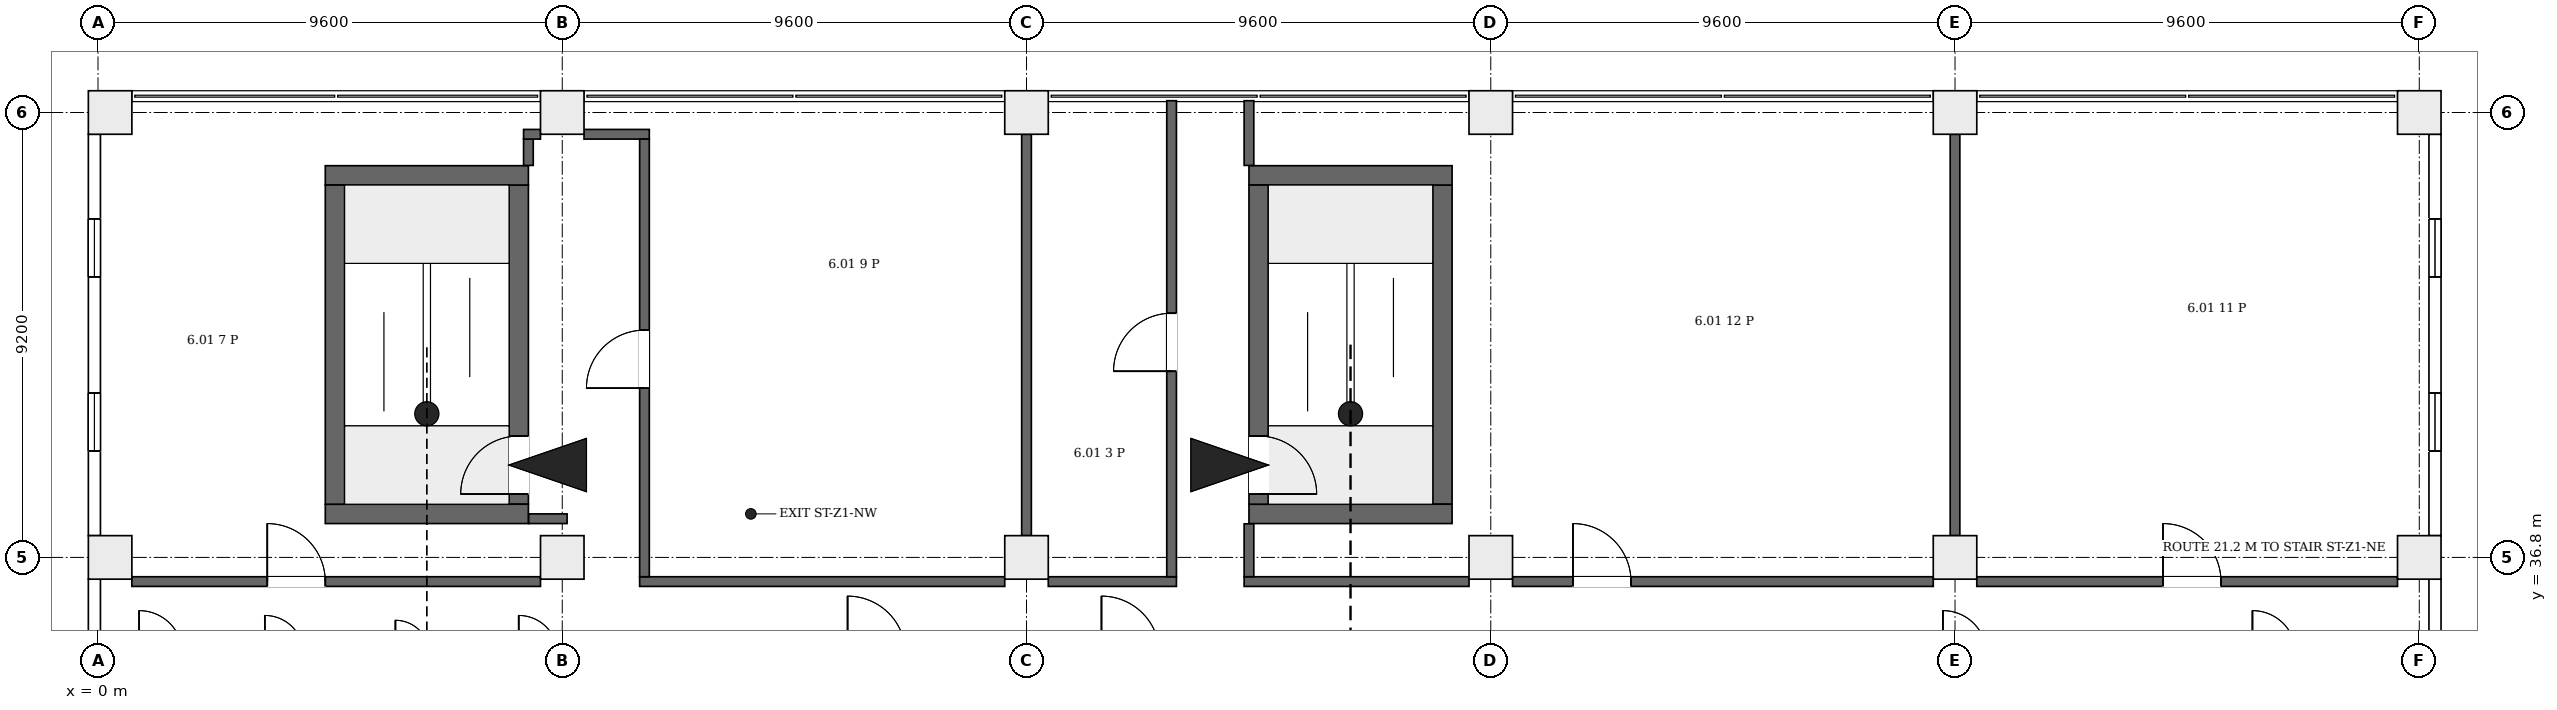
"""IFC4 building model, lengths in metres.
Left out: names, types, materials, properties, quantities, classifications, styles, units other than length and angle.
Written with IfcOpenShell. Run it as: python <this file> out.ifc"""

import sys

from ifc_helpers import new_model, si_unit, direction, frame, frame_2d, origin, origin_2d, place, context, subcontext, project, spatial, rectangle, extrude, element, fill, save


model = new_model("IFC4")
c1 = context("Model", 3, precision=1e-05, world=origin(), true_north=direction((0.0, 1.0)))
c2 = subcontext(c1, "Body", "Model", "MODEL_VIEW")
j1 = project(units=[si_unit("LENGTHUNIT", "METRE"), si_unit("PLANEANGLEUNIT", "RADIAN")], contexts=[c1])
p1 = place(None, origin())
s1 = spatial("IfcSite", under=j1, at=p1, CompositionType="ELEMENT")
p2 = place(p1, origin())
s2 = spatial("IfcBuilding", under=s1, at=p2, CompositionType="ELEMENT")
p3 = place(p2, frame((0.0, 0.0, 36.1)))
s3 = spatial("IfcBuildingStorey", under=s2, at=p3, CompositionType="ELEMENT", Elevation=36.1)
for number, where, z_axis, x_axis in (
    (1, (4.7, 37.7, 0.0), (0.0, 0.0, 1.0), (1.0, 0.0, 0.0)),
    (2, (4.7, 44.7, 0.0), (0.0, 0.0, 1.0), (1.0, 0.0, 0.0)),
):
    element("IfcWall", number, at=place(p3, frame(where, z_axis=z_axis, x_axis=x_axis)), inside=s3, PredefinedType="SHEAR", context=c2, shape_type="SweptSolid", body=[
        extrude(rectangle(XDim=4.2, YDim=0.4, at=frame_2d((2.1, 0.0))), origin(), (0.0, 0.0, 1.0), 4.2),
    ])
p4 = place(p3, frame((4.9, 37.9, 0.0), z_axis=(0.0, 0.0, 1.0), x_axis=(0.0, 1.0, 0.0)))
e3 = element("IfcWall", 3, at=p4, inside=s3, PredefinedType="SHEAR", context=c2, shape_type="SweptSolid", body=[
    extrude(rectangle(XDim=6.6, YDim=0.4, at=frame_2d((3.3, 0.0))), origin(), (0.0, 0.0, 1.0), 4.2),
])
p5 = place(p3, frame((8.7, 37.9, 0.0), z_axis=(0.0, 0.0, 1.0), x_axis=(0.0, 1.0, 0.0)))
e4 = element("IfcWall", 4, at=p5, inside=s3, PredefinedType="SHEAR", context=c2, shape_type="SweptSolid", body=[
    extrude(rectangle(XDim=6.6, YDim=0.4, at=frame_2d((3.3, 0.0))), origin(), (0.0, 0.0, 1.0), 4.2),
])
p6 = place(p5, frame((0.21, 0.0, 0.0)))
e5 = element("IfcOpeningElement", 5, at=p6, cuts=e4, PredefinedType="OPENING", context=c2, shape_type="SweptSolid", body=[
    extrude(rectangle(XDim=1.2, YDim=2.1, at=frame_2d((0.6, 1.05))), frame((0.0, 0.21, 0.0), z_axis=(0.0, -1.0, 0.0), x_axis=(1.0, 0.0, 0.0)), (0.0, 0.0, 1.0), 0.42),
])
for number, where, z_axis, x_axis in (
    (6, (23.8, 37.7, 0.0), (0.0, 0.0, 1.0), (1.0, 0.0, 0.0)),
    (7, (23.8, 44.7, 0.0), (0.0, 0.0, 1.0), (1.0, 0.0, 0.0)),
):
    element("IfcWall", number, at=place(p3, frame(where, z_axis=z_axis, x_axis=x_axis)), inside=s3, PredefinedType="SHEAR", context=c2, shape_type="SweptSolid", body=[
        extrude(rectangle(XDim=4.2, YDim=0.4, at=frame_2d((2.1, 0.0))), origin(), (0.0, 0.0, 1.0), 4.2),
    ])
p7 = place(p3, frame((24.0, 37.9, 0.0), z_axis=(0.0, 0.0, 1.0), x_axis=(0.0, 1.0, 0.0)))
e8 = element("IfcWall", 8, at=p7, inside=s3, PredefinedType="SHEAR", context=c2, shape_type="SweptSolid", body=[
    extrude(rectangle(XDim=6.6, YDim=0.4, at=frame_2d((3.3, 0.0))), origin(), (0.0, 0.0, 1.0), 4.2),
])
p8 = place(p7, frame((0.21, 0.0, 0.0)))
e9 = element("IfcOpeningElement", 9, at=p8, cuts=e8, PredefinedType="OPENING", context=c2, shape_type="SweptSolid", body=[
    extrude(rectangle(XDim=1.2, YDim=2.1, at=frame_2d((0.6, 1.05))), frame((0.0, 0.21, 0.0), z_axis=(0.0, -1.0, 0.0), x_axis=(1.0, 0.0, 0.0)), (0.0, 0.0, 1.0), 0.42),
])
p9 = place(p3, frame((27.8, 37.9, 0.0), z_axis=(0.0, 0.0, 1.0), x_axis=(0.0, 1.0, 0.0)))
e10 = element("IfcWall", 10, at=p9, inside=s3, PredefinedType="SHEAR", context=c2, shape_type="SweptSolid", body=[
    extrude(rectangle(XDim=6.6, YDim=0.4, at=frame_2d((3.3, 0.0))), origin(), (0.0, 0.0, 1.0), 4.2),
])
for number, where, z_axis, x_axis in (
    (11, (0.25, 36.8, 0.0), (0.0, 0.0, 1.0), (1.0, 0.0, 0.0)),
    (12, (9.6, 36.8, 0.0), (0.0, 0.0, 1.0), (1.0, 0.0, 0.0)),
    (13, (19.2, 36.8, 0.0), (0.0, 0.0, 1.0), (1.0, 0.0, 0.0)),
    (14, (28.8, 36.8, 0.0), (0.0, 0.0, 1.0), (1.0, 0.0, 0.0)),
    (15, (38.4, 36.8, 0.0), (0.0, 0.0, 1.0), (1.0, 0.0, 0.0)),
    (16, (48.0, 36.8, 0.0), (0.0, 0.0, 1.0), (1.0, 0.0, 0.0)),
    (17, (0.25, 46.0, 0.0), (0.0, 0.0, 1.0), (1.0, 0.0, 0.0)),
    (18, (9.6, 46.0, 0.0), (0.0, 0.0, 1.0), (1.0, 0.0, 0.0)),
    (19, (19.2, 46.0, 0.0), (0.0, 0.0, 1.0), (1.0, 0.0, 0.0)),
    (20, (28.8, 46.0, 0.0), (0.0, 0.0, 1.0), (1.0, 0.0, 0.0)),
    (21, (38.4, 46.0, 0.0), (0.0, 0.0, 1.0), (1.0, 0.0, 0.0)),
    (22, (48.0, 46.0, 0.0), (0.0, 0.0, 1.0), (1.0, 0.0, 0.0)),
):
    element("IfcColumn", number, at=place(p3, frame(where, z_axis=z_axis, x_axis=x_axis)), inside=s3, PredefinedType="COLUMN", context=c2, shape_type="SweptSolid", body=[
        extrude(rectangle(XDim=0.9, YDim=0.9, at=origin_2d()), origin(), (0.0, 0.0, 1.0), 4.2),
    ])
p10 = place(p3, frame((-0.074, 36.35, 0.0), z_axis=(0.0, 0.0, 1.0), x_axis=(0.0, -1.0, 0.0)))
e23 = element("IfcWall", 23, at=p10, inside=s3, PredefinedType="ELEMENTEDWALL", context=c2, shape_type="SweptSolid", body=[
    extrude(rectangle(XDim=8.3, YDim=0.25, at=frame_2d((4.15, 0.0))), origin(), (0.0, 0.0, 1.0), 3.9),
])
p11 = place(p10, frame((5.35, 0.0, 0.9)))
e24 = element("IfcOpeningElement", 24, at=p11, cuts=e23, PredefinedType="OPENING", context=c2, shape_type="SweptSolid", body=[
    extrude(rectangle(XDim=1.2, YDim=2.6, at=frame_2d((0.6, 1.3))), frame((0.0, 0.135, 0.0), z_axis=(0.0, -1.0, 0.0), x_axis=(1.0, 0.0, 0.0)), (0.0, 0.0, 1.0), 0.27),
])
p12 = place(p10, frame((1.75, 0.0, 0.9)))
e25 = element("IfcOpeningElement", 25, at=p12, cuts=e23, PredefinedType="OPENING", context=c2, shape_type="SweptSolid", body=[
    extrude(rectangle(XDim=1.2, YDim=2.6, at=frame_2d((0.6, 1.3))), frame((0.0, 0.135, 0.0), z_axis=(0.0, -1.0, 0.0), x_axis=(1.0, 0.0, 0.0)), (0.0, 0.0, 1.0), 0.27),
])
p13 = place(p3, frame((-0.074, 45.55, 0.0), z_axis=(0.0, 0.0, 1.0), x_axis=(0.0, -1.0, 0.0)))
e26 = element("IfcWall", 26, at=p13, inside=s3, PredefinedType="ELEMENTEDWALL", context=c2, shape_type="SweptSolid", body=[
    extrude(rectangle(XDim=8.3, YDim=0.25, at=frame_2d((4.15, 0.0))), origin(), (0.0, 0.0, 1.0), 3.9),
])
p14 = place(p13, frame((5.35, 0.0, 0.9)))
e27 = element("IfcOpeningElement", 27, at=p14, cuts=e26, PredefinedType="OPENING", context=c2, shape_type="SweptSolid", body=[
    extrude(rectangle(XDim=1.2, YDim=2.6, at=frame_2d((0.6, 1.3))), frame((0.0, 0.135, 0.0), z_axis=(0.0, -1.0, 0.0), x_axis=(1.0, 0.0, 0.0)), (0.0, 0.0, 1.0), 0.27),
])
p15 = place(p13, frame((1.75, 0.0, 0.9)))
e28 = element("IfcOpeningElement", 28, at=p15, cuts=e26, PredefinedType="OPENING", context=c2, shape_type="SweptSolid", body=[
    extrude(rectangle(XDim=1.2, YDim=2.6, at=frame_2d((0.6, 1.3))), frame((0.0, 0.135, 0.0), z_axis=(0.0, -1.0, 0.0), x_axis=(1.0, 0.0, 0.0)), (0.0, 0.0, 1.0), 0.27),
])
p16 = place(p3, frame((48.325, 28.05, 0.0), z_axis=(0.0, 0.0, 1.0), x_axis=(0.0, 1.0, 0.0)))
e29 = element("IfcWall", 29, at=p16, inside=s3, PredefinedType="ELEMENTEDWALL", context=c2, shape_type="SweptSolid", body=[
    extrude(rectangle(XDim=8.3, YDim=0.25, at=frame_2d((4.15, 0.0))), origin(), (0.0, 0.0, 1.0), 3.9),
])
p17 = place(p16, frame((1.75, 0.0, 0.9)))
e30 = element("IfcOpeningElement", 30, at=p17, cuts=e29, PredefinedType="OPENING", context=c2, shape_type="SweptSolid", body=[
    extrude(rectangle(XDim=1.2, YDim=2.6, at=frame_2d((0.6, 1.3))), frame((0.0, 0.135, 0.0), z_axis=(0.0, -1.0, 0.0), x_axis=(1.0, 0.0, 0.0)), (0.0, 0.0, 1.0), 0.27),
])
p18 = place(p16, frame((5.35, 0.0, 0.9)))
e31 = element("IfcOpeningElement", 31, at=p18, cuts=e29, PredefinedType="OPENING", context=c2, shape_type="SweptSolid", body=[
    extrude(rectangle(XDim=1.2, YDim=2.6, at=frame_2d((0.6, 1.3))), frame((0.0, 0.135, 0.0), z_axis=(0.0, -1.0, 0.0), x_axis=(1.0, 0.0, 0.0)), (0.0, 0.0, 1.0), 0.27),
])
p19 = place(p3, frame((48.325, 37.25, 0.0), z_axis=(0.0, 0.0, 1.0), x_axis=(0.0, 1.0, 0.0)))
e32 = element("IfcWall", 32, at=p19, inside=s3, PredefinedType="ELEMENTEDWALL", context=c2, shape_type="SweptSolid", body=[
    extrude(rectangle(XDim=8.3, YDim=0.25, at=frame_2d((4.15, 0.0))), origin(), (0.0, 0.0, 1.0), 3.9),
])
p20 = place(p19, frame((1.75, 0.0, 0.9)))
e33 = element("IfcOpeningElement", 33, at=p20, cuts=e32, PredefinedType="OPENING", context=c2, shape_type="SweptSolid", body=[
    extrude(rectangle(XDim=1.2, YDim=2.6, at=frame_2d((0.6, 1.3))), frame((0.0, 0.135, 0.0), z_axis=(0.0, -1.0, 0.0), x_axis=(1.0, 0.0, 0.0)), (0.0, 0.0, 1.0), 0.27),
])
p21 = place(p19, frame((5.35, 0.0, 0.9)))
e34 = element("IfcOpeningElement", 34, at=p21, cuts=e32, PredefinedType="OPENING", context=c2, shape_type="SweptSolid", body=[
    extrude(rectangle(XDim=1.2, YDim=2.6, at=frame_2d((0.6, 1.3))), frame((0.0, 0.135, 0.0), z_axis=(0.0, -1.0, 0.0), x_axis=(1.0, 0.0, 0.0)), (0.0, 0.0, 1.0), 0.27),
])
p22 = place(p3, frame((0.7, 36.3, 0.0), z_axis=(0.0, 0.0, 1.0), x_axis=(1.0, 0.0, 0.0)))
e35 = element("IfcWall", 35, at=p22, inside=s3, PredefinedType="PARTITIONING", context=c2, shape_type="SweptSolid", body=[
    extrude(rectangle(XDim=8.45, YDim=0.2, at=frame_2d((4.225, 0.0))), origin(), (0.0, 0.0, 1.0), 3.9),
])
p23 = place(p22, frame((2.8, 0.0, 0.0)))
e36 = element("IfcOpeningElement", 36, at=p23, cuts=e35, PredefinedType="OPENING", context=c2, shape_type="SweptSolid", body=[
    extrude(rectangle(XDim=1.2, YDim=2.1, at=frame_2d((0.6, 1.05))), frame((0.0, 0.11, 0.0), z_axis=(0.0, -1.0, 0.0), x_axis=(1.0, 0.0, 0.0)), (0.0, 0.0, 1.0), 0.22),
])
p24 = place(p3, frame((8.9, 44.906, 0.0), z_axis=(0.0, 0.0, 1.0), x_axis=(0.0, 1.0, 0.0)))
e37 = element("IfcWall", 37, at=p24, inside=s3, PredefinedType="PARTITIONING", context=c2, shape_type="SweptSolid", body=[
    extrude(rectangle(XDim=0.544, YDim=0.2, at=frame_2d((0.272, 0.0))), origin(), (0.0, 0.0, 1.0), 3.9),
])
p25 = place(p3, frame((8.8, 45.55, 0.0), z_axis=(0.0, 0.0, 1.0), x_axis=(1.0, 0.0, 0.0)))
e38 = element("IfcWall", 38, at=p25, inside=s3, PredefinedType="PARTITIONING", context=c2, shape_type="SweptSolid", body=[
    extrude(rectangle(XDim=0.35, YDim=0.2, at=frame_2d((0.175, 0.0))), origin(), (0.0, 0.0, 1.0), 3.9),
])
p26 = place(p3, frame((8.906, 37.6, 0.0), z_axis=(0.0, 0.0, 1.0), x_axis=(1.0, 0.0, 0.0)))
e39 = element("IfcWall", 39, at=p26, inside=s3, PredefinedType="PARTITIONING", context=c2, shape_type="SweptSolid", body=[
    extrude(rectangle(XDim=0.794, YDim=0.2, at=frame_2d((0.397, 0.0))), origin(), (0.0, 0.0, 1.0), 3.9),
])
p27 = place(p3, frame((10.05, 45.55, 0.0), z_axis=(0.0, 0.0, 1.0), x_axis=(1.0, 0.0, 0.0)))
e40 = element("IfcWall", 40, at=p27, inside=s3, PredefinedType="PARTITIONING", context=c2, shape_type="SweptSolid", body=[
    extrude(rectangle(XDim=1.35, YDim=0.2, at=frame_2d((0.675, 0.0))), origin(), (0.0, 0.0, 1.0), 3.9),
])
p28 = place(p3, frame((11.2, 36.3, 0.0), z_axis=(0.0, 0.0, 1.0), x_axis=(1.0, 0.0, 0.0)))
e41 = element("IfcWall", 41, at=p28, inside=s3, PredefinedType="PARTITIONING", context=c2, shape_type="SweptSolid", body=[
    extrude(rectangle(XDim=7.55, YDim=0.2, at=frame_2d((3.775, 0.0))), origin(), (0.0, 0.0, 1.0), 3.9),
])
p29 = place(p3, frame((11.3, 36.4, 0.0), z_axis=(0.0, 0.0, 1.0), x_axis=(0.0, 1.0, 0.0)))
e42 = element("IfcWall", 42, at=p29, inside=s3, PredefinedType="PARTITIONING", context=c2, shape_type="SweptSolid", body=[
    extrude(rectangle(XDim=9.05, YDim=0.2, at=frame_2d((4.525, 0.0))), origin(), (0.0, 0.0, 1.0), 3.9),
])
p30 = place(p29, frame((3.9, 0.0, 0.0)))
e43 = element("IfcOpeningElement", 43, at=p30, cuts=e42, PredefinedType="OPENING", context=c2, shape_type="SweptSolid", body=[
    extrude(rectangle(XDim=1.2, YDim=2.1, at=frame_2d((0.6, 1.05))), frame((0.0, 0.11, 0.0), z_axis=(0.0, -1.0, 0.0), x_axis=(1.0, 0.0, 0.0)), (0.0, 0.0, 1.0), 0.22),
])
p31 = place(p3, frame((19.2, 37.25, 0.0), z_axis=(0.0, 0.0, 1.0), x_axis=(0.0, 1.0, 0.0)))
e44 = element("IfcWall", 44, at=p31, inside=s3, PredefinedType="PARTITIONING", context=c2, shape_type="SweptSolid", body=[
    extrude(rectangle(XDim=8.3, YDim=0.2, at=frame_2d((4.15, 0.0))), origin(), (0.0, 0.0, 1.0), 3.9),
])
p32 = place(p3, frame((19.65, 36.3, 0.0), z_axis=(0.0, 0.0, 1.0), x_axis=(1.0, 0.0, 0.0)))
e45 = element("IfcWall", 45, at=p32, inside=s3, PredefinedType="PARTITIONING", context=c2, shape_type="SweptSolid", body=[
    extrude(rectangle(XDim=2.65, YDim=0.2, at=frame_2d((1.325, 0.0))), origin(), (0.0, 0.0, 1.0), 3.9),
])
p33 = place(p3, frame((22.2, 36.4, 0.0), z_axis=(0.0, 0.0, 1.0), x_axis=(0.0, 1.0, 0.0)))
e46 = element("IfcWall", 46, at=p33, inside=s3, PredefinedType="PARTITIONING", context=c2, shape_type="SweptSolid", body=[
    extrude(rectangle(XDim=9.844, YDim=0.2, at=frame_2d((4.922, 0.0))), origin(), (0.0, 0.0, 1.0), 3.9),
])
p34 = place(p33, frame((4.25, 0.0, 0.0)))
e47 = element("IfcOpeningElement", 47, at=p34, cuts=e46, PredefinedType="OPENING", context=c2, shape_type="SweptSolid", body=[
    extrude(rectangle(XDim=1.2, YDim=2.1, at=frame_2d((0.6, 1.05))), frame((0.0, 0.11, 0.0), z_axis=(0.0, -1.0, 0.0), x_axis=(1.0, 0.0, 0.0)), (0.0, 0.0, 1.0), 0.22),
])
p35 = place(p3, frame((23.7, 36.3, 0.0), z_axis=(0.0, 0.0, 1.0), x_axis=(1.0, 0.0, 0.0)))
e48 = element("IfcWall", 48, at=p35, inside=s3, PredefinedType="PARTITIONING", context=c2, shape_type="SweptSolid", body=[
    extrude(rectangle(XDim=4.65, YDim=0.2, at=frame_2d((2.325, 0.0))), origin(), (0.0, 0.0, 1.0), 3.9),
])
p36 = place(p3, frame((23.8, 36.4, 0.0), z_axis=(0.0, 0.0, 1.0), x_axis=(0.0, 1.0, 0.0)))
e49 = element("IfcWall", 49, at=p36, inside=s3, PredefinedType="PARTITIONING", context=c2, shape_type="SweptSolid", body=[
    extrude(rectangle(XDim=1.094, YDim=0.2, at=frame_2d((0.547, 0.0))), origin(), (0.0, 0.0, 1.0), 3.9),
])
p37 = place(p3, frame((23.8, 44.906, 0.0), z_axis=(0.0, 0.0, 1.0), x_axis=(0.0, 1.0, 0.0)))
e50 = element("IfcWall", 50, at=p37, inside=s3, PredefinedType="PARTITIONING", context=c2, shape_type="SweptSolid", body=[
    extrude(rectangle(XDim=1.338, YDim=0.2, at=frame_2d((0.669, 0.0))), origin(), (0.0, 0.0, 1.0), 3.9),
])
p38 = place(p3, frame((29.25, 36.3, 0.0), z_axis=(0.0, 0.0, 1.0), x_axis=(1.0, 0.0, 0.0)))
e51 = element("IfcWall", 51, at=p38, inside=s3, PredefinedType="PARTITIONING", context=c2, shape_type="SweptSolid", body=[
    extrude(rectangle(XDim=8.7, YDim=0.2, at=frame_2d((4.35, 0.0))), origin(), (0.0, 0.0, 1.0), 3.9),
])
p39 = place(p38, frame((1.25, 0.0, 0.0)))
e52 = element("IfcOpeningElement", 52, at=p39, cuts=e51, PredefinedType="OPENING", context=c2, shape_type="SweptSolid", body=[
    extrude(rectangle(XDim=1.2, YDim=2.1, at=frame_2d((0.6, 1.05))), frame((0.0, 0.11, 0.0), z_axis=(0.0, -1.0, 0.0), x_axis=(1.0, 0.0, 0.0)), (0.0, 0.0, 1.0), 0.22),
])
p40 = place(p3, frame((38.4, 37.25, 0.0), z_axis=(0.0, 0.0, 1.0), x_axis=(0.0, 1.0, 0.0)))
e53 = element("IfcWall", 53, at=p40, inside=s3, PredefinedType="PARTITIONING", context=c2, shape_type="SweptSolid", body=[
    extrude(rectangle(XDim=8.3, YDim=0.2, at=frame_2d((4.15, 0.0))), origin(), (0.0, 0.0, 1.0), 3.9),
])
p41 = place(p3, frame((38.85, 36.3, 0.0), z_axis=(0.0, 0.0, 1.0), x_axis=(1.0, 0.0, 0.0)))
e54 = element("IfcWall", 54, at=p41, inside=s3, PredefinedType="PARTITIONING", context=c2, shape_type="SweptSolid", body=[
    extrude(rectangle(XDim=8.7, YDim=0.2, at=frame_2d((4.35, 0.0))), origin(), (0.0, 0.0, 1.0), 3.9),
])
p42 = place(p41, frame((3.85, 0.0, 0.0)))
e55 = element("IfcOpeningElement", 55, at=p42, cuts=e54, PredefinedType="OPENING", context=c2, shape_type="SweptSolid", body=[
    extrude(rectangle(XDim=1.2, YDim=2.1, at=frame_2d((0.6, 1.05))), frame((0.0, 0.11, 0.0), z_axis=(0.0, -1.0, 0.0), x_axis=(1.0, 0.0, 0.0)), (0.0, 0.0, 1.0), 0.22),
])
p43 = place(p14, origin())
e56 = element("IfcWindow", 56, at=p43, inside=s3, PartitioningType="SINGLE_PANEL", PredefinedType="WINDOW", context=c2, shape_type="SweptSolid", body=[
    extrude(rectangle(XDim=1.2, YDim=2.6, at=frame_2d((0.6, 1.3))), frame((0.0, 0.03, 0.0), z_axis=(0.0, -1.0, 0.0), x_axis=(1.0, 0.0, 0.0)), (0.0, 0.0, 1.0), 0.06),
])
fill(e27, e56)
p44 = place(p15, origin())
e57 = element("IfcWindow", 57, at=p44, inside=s3, PartitioningType="SINGLE_PANEL", PredefinedType="WINDOW", context=c2, shape_type="SweptSolid", body=[
    extrude(rectangle(XDim=1.2, YDim=2.6, at=frame_2d((0.6, 1.3))), frame((0.0, 0.03, 0.0), z_axis=(0.0, -1.0, 0.0), x_axis=(1.0, 0.0, 0.0)), (0.0, 0.0, 1.0), 0.06),
])
fill(e28, e57)
p45 = place(p20, origin())
e58 = element("IfcWindow", 58, at=p45, inside=s3, PartitioningType="SINGLE_PANEL", PredefinedType="WINDOW", context=c2, shape_type="SweptSolid", body=[
    extrude(rectangle(XDim=1.2, YDim=2.6, at=frame_2d((0.6, 1.3))), frame((0.0, 0.03, 0.0), z_axis=(0.0, -1.0, 0.0), x_axis=(1.0, 0.0, 0.0)), (0.0, 0.0, 1.0), 0.06),
])
fill(e33, e58)
p46 = place(p21, origin())
e59 = element("IfcWindow", 59, at=p46, inside=s3, PartitioningType="SINGLE_PANEL", PredefinedType="WINDOW", context=c2, shape_type="SweptSolid", body=[
    extrude(rectangle(XDim=1.2, YDim=2.6, at=frame_2d((0.6, 1.3))), frame((0.0, 0.03, 0.0), z_axis=(0.0, -1.0, 0.0), x_axis=(1.0, 0.0, 0.0)), (0.0, 0.0, 1.0), 0.06),
])
fill(e34, e59)
p47 = place(p6, origin())
e60 = element("IfcDoor", 60, at=p47, inside=s3, OperationType="SINGLE_SWING_RIGHT", PredefinedType="DOOR", context=c2, shape_type="SweptSolid", body=[
    extrude(rectangle(XDim=1.2, YDim=2.1, at=frame_2d((0.6, 1.05))), frame((0.0, 0.025, 0.0), z_axis=(0.0, -1.0, 0.0), x_axis=(1.0, 0.0, 0.0)), (0.0, 0.0, 1.0), 0.05),
])
fill(e5, e60)
p48 = place(p8, origin())
e61 = element("IfcDoor", 61, at=p48, inside=s3, OperationType="SINGLE_SWING_LEFT", PredefinedType="DOOR", context=c2, shape_type="SweptSolid", body=[
    extrude(rectangle(XDim=1.2, YDim=2.1, at=frame_2d((0.6, 1.05))), frame((0.0, 0.025, 0.0), z_axis=(0.0, -1.0, 0.0), x_axis=(1.0, 0.0, 0.0)), (0.0, 0.0, 1.0), 0.05),
])
fill(e9, e61)
p49 = place(p23, origin())
e62 = element("IfcDoor", 62, at=p49, inside=s3, OperationType="SINGLE_SWING_RIGHT", PredefinedType="DOOR", context=c2, shape_type="SweptSolid", body=[
    extrude(rectangle(XDim=1.2, YDim=2.1, at=frame_2d((0.6, 1.05))), frame((0.0, 0.025, 0.0), z_axis=(0.0, -1.0, 0.0), x_axis=(1.0, 0.0, 0.0)), (0.0, 0.0, 1.0), 0.05),
])
fill(e36, e62)
p50 = place(p30, origin())
e63 = element("IfcDoor", 63, at=p50, inside=s3, OperationType="SINGLE_SWING_LEFT", PredefinedType="DOOR", context=c2, shape_type="SweptSolid", body=[
    extrude(rectangle(XDim=1.2, YDim=2.1, at=frame_2d((0.6, 1.05))), frame((0.0, 0.025, 0.0), z_axis=(0.0, -1.0, 0.0), x_axis=(1.0, 0.0, 0.0)), (0.0, 0.0, 1.0), 0.05),
])
fill(e43, e63)
p51 = place(p34, origin())
e64 = element("IfcDoor", 64, at=p51, inside=s3, OperationType="SINGLE_SWING_RIGHT", PredefinedType="DOOR", context=c2, shape_type="SweptSolid", body=[
    extrude(rectangle(XDim=1.2, YDim=2.1, at=frame_2d((0.6, 1.05))), frame((0.0, 0.025, 0.0), z_axis=(0.0, -1.0, 0.0), x_axis=(1.0, 0.0, 0.0)), (0.0, 0.0, 1.0), 0.05),
])
fill(e47, e64)
p52 = place(p39, origin())
e65 = element("IfcDoor", 65, at=p52, inside=s3, OperationType="SINGLE_SWING_LEFT", PredefinedType="DOOR", context=c2, shape_type="SweptSolid", body=[
    extrude(rectangle(XDim=1.2, YDim=2.1, at=frame_2d((0.6, 1.05))), frame((0.0, 0.025, 0.0), z_axis=(0.0, -1.0, 0.0), x_axis=(1.0, 0.0, 0.0)), (0.0, 0.0, 1.0), 0.05),
])
fill(e52, e65)
p53 = place(p42, origin())
e66 = element("IfcDoor", 66, at=p53, inside=s3, OperationType="SINGLE_SWING_RIGHT", PredefinedType="DOOR", context=c2, shape_type="SweptSolid", body=[
    extrude(rectangle(XDim=1.2, YDim=2.1, at=frame_2d((0.6, 1.05))), frame((0.0, 0.025, 0.0), z_axis=(0.0, -1.0, 0.0), x_axis=(1.0, 0.0, 0.0)), (0.0, 0.0, 1.0), 0.05),
])
fill(e55, e66)
save(model, sys.argv[1])
